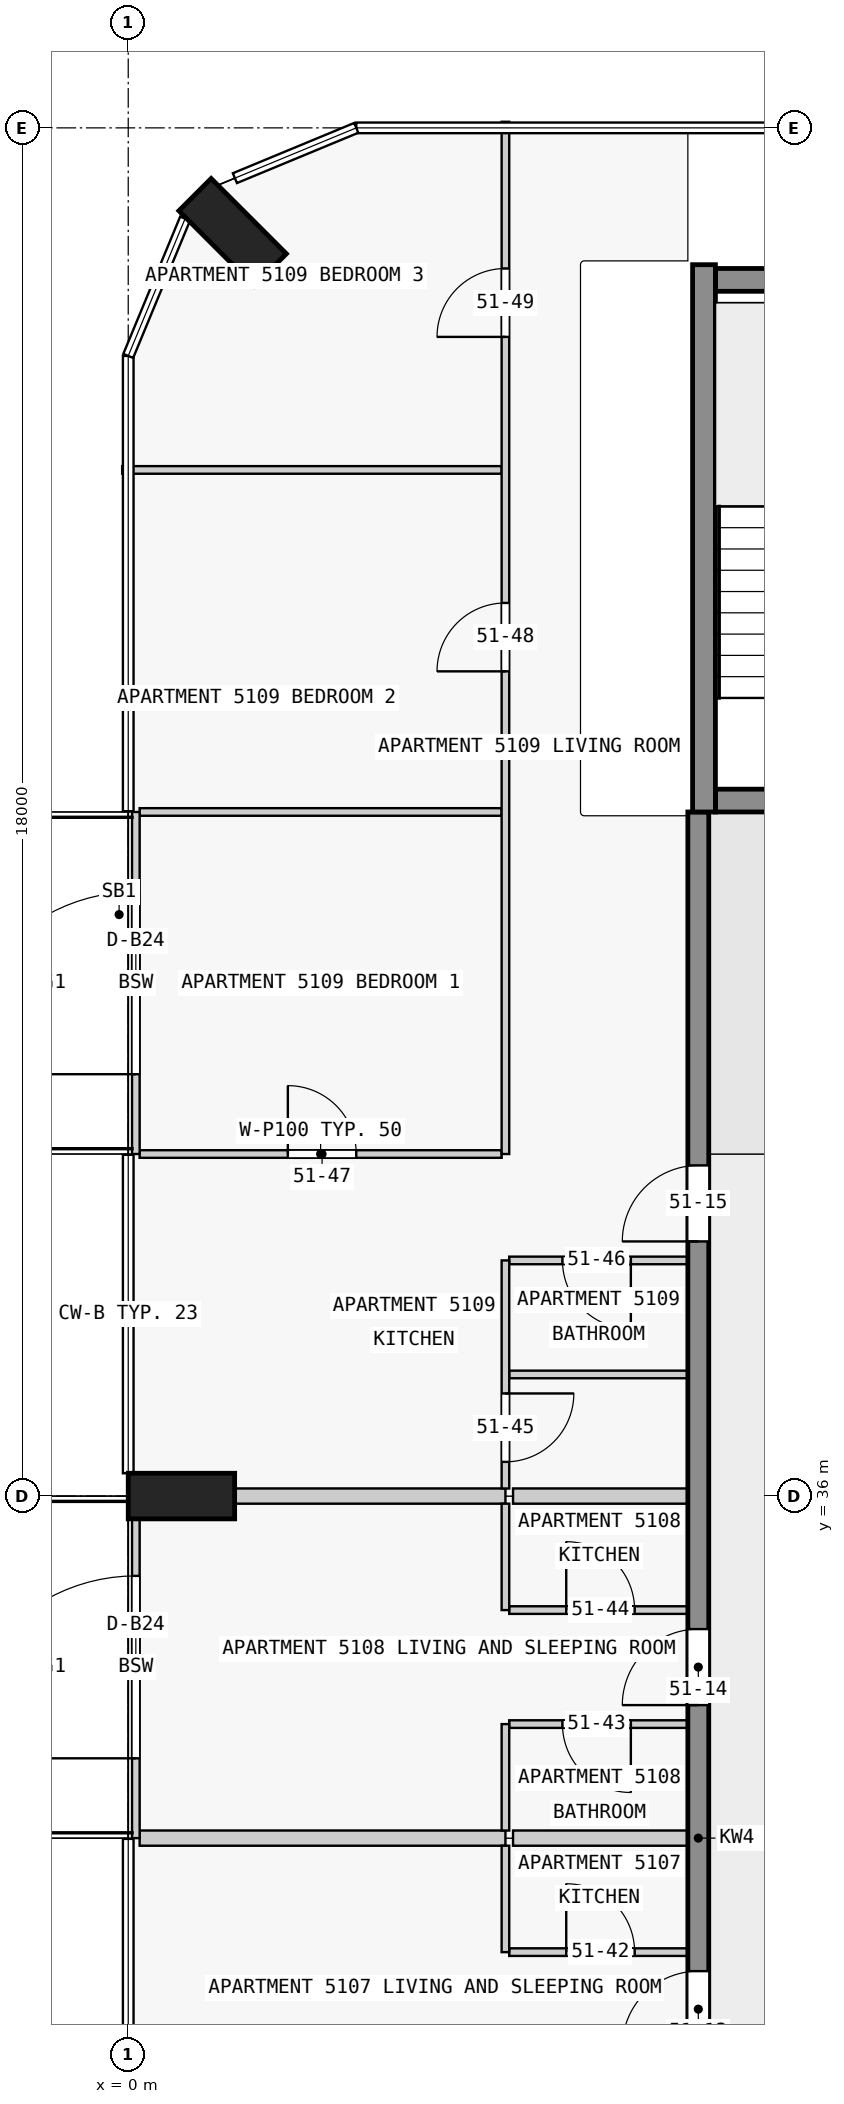
"""IFC4 building model, lengths in metres.
Left out: names, types, materials, properties, quantities, classifications, styles, units other than length and angle.
Written with IfcOpenShell. Run it as: python <this file> out.ifc"""

import sys

from ifc_helpers import new_model, si_unit, direction, frame, frame_2d, origin, origin_2d, place, context, subcontext, project, spatial, rectangle, extrude, element, fill, save


model = new_model("IFC4")
c1 = context("Model", 3, precision=1e-05, world=origin(), true_north=direction((0.0, 1.0)))
c2 = subcontext(c1, "Body", "Model", "MODEL_VIEW")
j1 = project(units=[si_unit("LENGTHUNIT", "METRE"), si_unit("PLANEANGLEUNIT", "RADIAN")], contexts=[c1])
p1 = place(None, origin())
s1 = spatial("IfcSite", under=j1, at=p1, CompositionType="ELEMENT")
p2 = place(p1, origin())
s2 = spatial("IfcBuilding", under=s1, at=p2, CompositionType="ELEMENT")
p3 = place(p2, frame((0.0, 0.0, 197.9)))
s3 = spatial("IfcBuildingStorey", under=s2, at=p3, CompositionType="ELEMENT", Elevation=197.9)
for number, where, z_axis, x_axis in (
    (1, (1.374, 52.626, 0.0), (0.0, 0.0, 1.0), (0.707, 0.707, 0.0)),
    (2, (0.7, 36.0, 0.0), (0.0, 0.0, 1.0), (0.0, 1.0, 0.0)),
):
    element("IfcColumn", number, at=place(p3, frame(where, z_axis=z_axis, x_axis=x_axis)), inside=s3, PredefinedType="COLUMN", context=c2, shape_type="SweptSolid", body=[
        extrude(rectangle(XDim=0.6, YDim=1.4, at=origin_2d()), origin(), (0.0, 0.0, 1.0), 3.5),
    ])
p4 = place(p3, frame((7.725, 45.15, 0.0), z_axis=(0.0, 0.0, 1.0), x_axis=(1.0, 0.0, 0.0)))
e3 = element("IfcWall", 3, at=p4, inside=s3, PredefinedType="SHEAR", context=c2, shape_type="SweptSolid", body=[
    extrude(rectangle(XDim=2.55, YDim=0.3, at=frame_2d((1.275, 0.0))), origin(), (0.0, 0.0, 1.0), 3.5),
])
p5 = place(p4, frame((0.725, 0.0, 0.0)))
e4 = element("IfcOpeningElement", 4, at=p5, cuts=e3, PredefinedType="OPENING", context=c2, shape_type="SweptSolid", body=[
    extrude(rectangle(XDim=1.1, YDim=2.1, at=frame_2d((0.55, 1.05))), frame((0.0, 0.16, 0.0), z_axis=(0.0, -1.0, 0.0), x_axis=(1.0, 0.0, 0.0)), (0.0, 0.0, 1.0), 0.32),
])
p6 = place(p3, frame((7.725, 52.0, 0.0), z_axis=(0.0, 0.0, 1.0), x_axis=(1.0, 0.0, 0.0)))
e5 = element("IfcWall", 5, at=p6, inside=s3, PredefinedType="SHEAR", context=c2, shape_type="SweptSolid", body=[
    extrude(rectangle(XDim=2.55, YDim=0.3, at=frame_2d((1.275, 0.0))), origin(), (0.0, 0.0, 1.0), 3.5),
])
p7 = place(p3, frame((7.575, 45.0, 0.0), z_axis=(0.0, 0.0, 1.0), x_axis=(0.0, 1.0, 0.0)))
e6 = element("IfcWall", 6, at=p7, inside=s3, PredefinedType="SHEAR", context=c2, shape_type="SweptSolid", body=[
    extrude(rectangle(XDim=7.2, YDim=0.3, at=frame_2d((3.6, 0.0))), origin(), (0.0, 0.0, 1.0), 3.5),
])
p8 = place(p3, frame((7.5, 18.0, 0.0), z_axis=(0.0, 0.0, 1.0), x_axis=(0.0, 1.0, 0.0)))
e7 = element("IfcWall", 7, at=p8, inside=s3, PredefinedType="SHEAR", context=c2, shape_type="SweptSolid", body=[
    extrude(rectangle(XDim=27.0, YDim=0.275, at=frame_2d((13.5, 0.0))), origin(), (0.0, 0.0, 1.0), 3.25),
])
p9 = place(p8, frame((1.75, 0.0, 0.0)))
e8 = element("IfcOpeningElement", 8, at=p9, cuts=e7, PredefinedType="OPENING", context=c2, shape_type="SweptSolid", body=[
    extrude(rectangle(XDim=1.0, YDim=2.1, at=frame_2d((0.5, 1.05))), frame((0.0, 0.147, 0.0), z_axis=(0.0, -1.0, 0.0), x_axis=(1.0, 0.0, 0.0)), (0.0, 0.0, 1.0), 0.295),
])
p10 = place(p8, frame((5.85, 0.0, 0.0)))
e9 = element("IfcOpeningElement", 9, at=p10, cuts=e7, PredefinedType="OPENING", context=c2, shape_type="SweptSolid", body=[
    extrude(rectangle(XDim=1.8, YDim=2.1, at=frame_2d((0.9, 1.05))), frame((0.0, 0.147, 0.0), z_axis=(0.0, -1.0, 0.0), x_axis=(1.0, 0.0, 0.0)), (0.0, 0.0, 1.0), 0.295),
])
p11 = place(p8, frame((10.75, 0.0, 0.0)))
e10 = element("IfcOpeningElement", 10, at=p11, cuts=e7, PredefinedType="OPENING", context=c2, shape_type="SweptSolid", body=[
    extrude(rectangle(XDim=1.0, YDim=2.1, at=frame_2d((0.5, 1.05))), frame((0.0, 0.147, 0.0), z_axis=(0.0, -1.0, 0.0), x_axis=(1.0, 0.0, 0.0)), (0.0, 0.0, 1.0), 0.295),
])
p12 = place(p8, frame((15.25, 0.0, 0.0)))
e11 = element("IfcOpeningElement", 11, at=p12, cuts=e7, PredefinedType="OPENING", context=c2, shape_type="SweptSolid", body=[
    extrude(rectangle(XDim=1.0, YDim=2.1, at=frame_2d((0.5, 1.05))), frame((0.0, 0.147, 0.0), z_axis=(0.0, -1.0, 0.0), x_axis=(1.0, 0.0, 0.0)), (0.0, 0.0, 1.0), 0.295),
])
p13 = place(p8, frame((21.35, 0.0, 0.0)))
e12 = element("IfcOpeningElement", 12, at=p13, cuts=e7, PredefinedType="OPENING", context=c2, shape_type="SweptSolid", body=[
    extrude(rectangle(XDim=1.0, YDim=2.1, at=frame_2d((0.5, 1.05))), frame((0.0, 0.147, 0.0), z_axis=(0.0, -1.0, 0.0), x_axis=(1.0, 0.0, 0.0)), (0.0, 0.0, 1.0), 0.295),
])
p14 = place(p3, frame((0.1, 31.5, 0.0), z_axis=(0.0, 0.0, 1.0), x_axis=(0.0, 1.0, 0.0)))
e13 = element("IfcWall", 13, at=p14, inside=s3, PredefinedType="STANDARD", context=c2, shape_type="SweptSolid", body=[
    extrude(rectangle(XDim=4.5, YDim=0.1, at=frame_2d((2.25, 0.0))), origin(), (0.0, 0.0, 1.0), 3.25),
])
p15 = place(p14, frame((1.05, 0.0, 0.0)))
e14 = element("IfcOpeningElement", 14, at=p15, cuts=e13, PredefinedType="OPENING", context=c2, shape_type="SweptSolid", body=[
    extrude(rectangle(XDim=2.4, YDim=2.4, at=frame_2d((1.2, 1.2))), frame((0.0, 0.06, 0.0), z_axis=(0.0, -1.0, 0.0), x_axis=(1.0, 0.0, 0.0)), (0.0, 0.0, 1.0), 0.12),
])
p16 = place(p3, frame((0.1, 40.5, 0.0), z_axis=(0.0, 0.0, 1.0), x_axis=(0.0, 1.0, 0.0)))
e15 = element("IfcWall", 15, at=p16, inside=s3, PredefinedType="STANDARD", context=c2, shape_type="SweptSolid", body=[
    extrude(rectangle(XDim=4.5, YDim=0.1, at=frame_2d((2.25, 0.0))), origin(), (0.0, 0.0, 1.0), 3.25),
])
p17 = place(p16, frame((1.05, 0.0, 0.0)))
e16 = element("IfcOpeningElement", 16, at=p17, cuts=e15, PredefinedType="OPENING", context=c2, shape_type="SweptSolid", body=[
    extrude(rectangle(XDim=2.4, YDim=2.4, at=frame_2d((1.2, 1.2))), frame((0.0, 0.06, 0.0), z_axis=(0.0, -1.0, 0.0), x_axis=(1.0, 0.0, 0.0)), (0.0, 0.0, 1.0), 0.12),
])
p18 = place(p3, frame((5.012, 30.0, 0.0), z_axis=(0.0, 0.0, 1.0), x_axis=(1.0, 0.0, 0.0)))
e17 = element("IfcWall", 17, at=p18, inside=s3, PredefinedType="PARTITIONING", context=c2, shape_type="SweptSolid", body=[
    extrude(rectangle(XDim=2.35, YDim=0.1, at=frame_2d((1.175, 0.0))), origin(), (0.0, 0.0, 1.0), 3.25),
])
p19 = place(p18, frame((0.75, 0.0, 0.0)))
e18 = element("IfcOpeningElement", 18, at=p19, cuts=e17, PredefinedType="OPENING", context=c2, shape_type="SweptSolid", body=[
    extrude(rectangle(XDim=0.9, YDim=2.1, at=frame_2d((0.45, 1.05))), frame((0.0, 0.06, 0.0), z_axis=(0.0, -1.0, 0.0), x_axis=(1.0, 0.0, 0.0)), (0.0, 0.0, 1.0), 0.12),
])
p20 = place(p3, frame((7.363, 31.5, 0.0), z_axis=(0.0, 0.0, 1.0), x_axis=(-1.0, 0.0, 0.0)))
e19 = element("IfcWall", 19, at=p20, inside=s3, PredefinedType="PARTITIONING", context=c2, shape_type="SweptSolid", body=[
    extrude(rectangle(XDim=2.3, YDim=0.2, at=frame_2d((1.15, 0.0))), origin(), (0.0, 0.0, 1.0), 3.25),
])
p21 = place(p3, frame((0.15, 31.5, 0.0), z_axis=(0.0, 0.0, 1.0), x_axis=(1.0, 0.0, 0.0)))
e20 = element("IfcWall", 20, at=p21, inside=s3, PredefinedType="PARTITIONING", context=c2, shape_type="SweptSolid", body=[
    extrude(rectangle(XDim=4.812, YDim=0.2, at=frame_2d((2.406, 0.0))), origin(), (0.0, 0.0, 1.0), 3.25),
])
p22 = place(p3, frame((7.363, 33.0, 0.0), z_axis=(0.0, 0.0, 1.0), x_axis=(-1.0, 0.0, 0.0)))
e21 = element("IfcWall", 21, at=p22, inside=s3, PredefinedType="PARTITIONING", context=c2, shape_type="SweptSolid", body=[
    extrude(rectangle(XDim=2.35, YDim=0.1, at=frame_2d((1.175, 0.0))), origin(), (0.0, 0.0, 1.0), 3.25),
])
p23 = place(p22, frame((0.75, 0.0, 0.0)))
e22 = element("IfcOpeningElement", 22, at=p23, cuts=e21, PredefinedType="OPENING", context=c2, shape_type="SweptSolid", body=[
    extrude(rectangle(XDim=0.9, YDim=2.1, at=frame_2d((0.45, 1.05))), frame((0.0, 0.06, 0.0), z_axis=(0.0, -1.0, 0.0), x_axis=(1.0, 0.0, 0.0)), (0.0, 0.0, 1.0), 0.12),
])
p24 = place(p3, frame((5.012, 34.5, 0.0), z_axis=(0.0, 0.0, 1.0), x_axis=(1.0, 0.0, 0.0)))
e23 = element("IfcWall", 23, at=p24, inside=s3, PredefinedType="PARTITIONING", context=c2, shape_type="SweptSolid", body=[
    extrude(rectangle(XDim=2.35, YDim=0.1, at=frame_2d((1.175, 0.0))), origin(), (0.0, 0.0, 1.0), 3.25),
])
p25 = place(p24, frame((0.75, 0.0, 0.0)))
e24 = element("IfcOpeningElement", 24, at=p25, cuts=e23, PredefinedType="OPENING", context=c2, shape_type="SweptSolid", body=[
    extrude(rectangle(XDim=0.9, YDim=2.1, at=frame_2d((0.45, 1.05))), frame((0.0, 0.06, 0.0), z_axis=(0.0, -1.0, 0.0), x_axis=(1.0, 0.0, 0.0)), (0.0, 0.0, 1.0), 0.12),
])
p26 = place(p3, frame((7.363, 36.0, 0.0), z_axis=(0.0, 0.0, 1.0), x_axis=(-1.0, 0.0, 0.0)))
e25 = element("IfcWall", 25, at=p26, inside=s3, PredefinedType="PARTITIONING", context=c2, shape_type="SweptSolid", body=[
    extrude(rectangle(XDim=2.3, YDim=0.2, at=frame_2d((1.15, 0.0))), origin(), (0.0, 0.0, 1.0), 3.25),
])
p27 = place(p3, frame((1.4, 36.0, 0.0), z_axis=(0.0, 0.0, 1.0), x_axis=(1.0, 0.0, 0.0)))
e26 = element("IfcWall", 26, at=p27, inside=s3, PredefinedType="PARTITIONING", context=c2, shape_type="SweptSolid", body=[
    extrude(rectangle(XDim=3.562, YDim=0.2, at=frame_2d((1.781, 0.0))), origin(), (0.0, 0.0, 1.0), 3.25),
])
p28 = place(p3, frame((7.363, 37.6, 0.0), z_axis=(0.0, 0.0, 1.0), x_axis=(-1.0, 0.0, 0.0)))
e27 = element("IfcWall", 27, at=p28, inside=s3, PredefinedType="PARTITIONING", context=c2, shape_type="SweptSolid", body=[
    extrude(rectangle(XDim=2.35, YDim=0.1, at=frame_2d((1.175, 0.0))), origin(), (0.0, 0.0, 1.0), 3.25),
])
p29 = place(p3, frame((7.363, 39.1, 0.0), z_axis=(0.0, 0.0, 1.0), x_axis=(-1.0, 0.0, 0.0)))
e28 = element("IfcWall", 28, at=p29, inside=s3, PredefinedType="PARTITIONING", context=c2, shape_type="SweptSolid", body=[
    extrude(rectangle(XDim=2.35, YDim=0.1, at=frame_2d((1.175, 0.0))), origin(), (0.0, 0.0, 1.0), 3.25),
])
p30 = place(p29, frame((0.75, 0.0, 0.0)))
e29 = element("IfcOpeningElement", 29, at=p30, cuts=e28, PredefinedType="OPENING", context=c2, shape_type="SweptSolid", body=[
    extrude(rectangle(XDim=0.9, YDim=2.1, at=frame_2d((0.45, 1.05))), frame((0.0, 0.06, 0.0), z_axis=(0.0, -1.0, 0.0), x_axis=(1.0, 0.0, 0.0)), (0.0, 0.0, 1.0), 0.12),
])
p31 = place(p3, frame((0.15, 40.5, 0.0), z_axis=(0.0, 0.0, 1.0), x_axis=(1.0, 0.0, 0.0)))
e30 = element("IfcWall", 30, at=p31, inside=s3, PredefinedType="PARTITIONING", context=c2, shape_type="SweptSolid", body=[
    extrude(rectangle(XDim=4.763, YDim=0.1, at=frame_2d((2.381, 0.0))), origin(), (0.0, 0.0, 1.0), 3.25),
])
p32 = place(p31, frame((1.95, 0.0, 0.0)))
e31 = element("IfcOpeningElement", 31, at=p32, cuts=e30, PredefinedType="OPENING", context=c2, shape_type="SweptSolid", body=[
    extrude(rectangle(XDim=0.9, YDim=2.1, at=frame_2d((0.45, 1.05))), frame((0.0, 0.06, 0.0), z_axis=(0.0, -1.0, 0.0), x_axis=(1.0, 0.0, 0.0)), (0.0, 0.0, 1.0), 0.12),
])
p33 = place(p3, frame((4.913, 45.0, 0.0), z_axis=(0.0, 0.0, 1.0), x_axis=(-1.0, 0.0, 0.0)))
e32 = element("IfcWall", 32, at=p33, inside=s3, PredefinedType="PARTITIONING", context=c2, shape_type="SweptSolid", body=[
    extrude(rectangle(XDim=4.763, YDim=0.1, at=frame_2d((2.381, 0.0))), origin(), (0.0, 0.0, 1.0), 3.25),
])
p34 = place(p3, frame((4.913, 49.5, 0.0), z_axis=(0.0, 0.0, 1.0), x_axis=(-1.0, 0.0, 0.0)))
e33 = element("IfcWall", 33, at=p34, inside=s3, PredefinedType="PARTITIONING", context=c2, shape_type="SweptSolid", body=[
    extrude(rectangle(XDim=4.993, YDim=0.1, at=frame_2d((2.496, 0.0))), origin(), (0.0, 0.0, 1.0), 3.25),
])
for number, where, z_axis, x_axis in (
    (34, (4.962, 31.4, 0.0), (0.0, 0.0, 1.0), (0.0, -1.0, 0.0)),
    (35, (4.962, 33.0, 0.0), (0.0, 0.0, 1.0), (0.0, -1.0, 0.0)),
    (36, (4.962, 35.9, 0.0), (0.0, 0.0, 1.0), (0.0, -1.0, 0.0)),
):
    element("IfcWall", number, at=place(p3, frame(where, z_axis=z_axis, x_axis=x_axis)), inside=s3, PredefinedType="PARTITIONING", context=c2, shape_type="SweptSolid", body=[
        extrude(rectangle(XDim=1.4, YDim=0.1, at=frame_2d((0.7, 0.0))), origin(), (0.0, 0.0, 1.0), 3.25),
    ])
p35 = place(p3, frame((4.962, 39.1, 0.0), z_axis=(0.0, 0.0, 1.0), x_axis=(0.0, -1.0, 0.0)))
e37 = element("IfcWall", 37, at=p35, inside=s3, PredefinedType="PARTITIONING", context=c2, shape_type="SweptSolid", body=[
    extrude(rectangle(XDim=3.0, YDim=0.1, at=frame_2d((1.5, 0.0))), origin(), (0.0, 0.0, 1.0), 3.25),
])
p36 = place(p35, frame((1.75, 0.0, 0.0)))
e38 = element("IfcOpeningElement", 38, at=p36, cuts=e37, PredefinedType="OPENING", context=c2, shape_type="SweptSolid", body=[
    extrude(rectangle(XDim=0.9, YDim=2.1, at=frame_2d((0.45, 1.05))), frame((0.0, 0.06, 0.0), z_axis=(0.0, -1.0, 0.0), x_axis=(1.0, 0.0, 0.0)), (0.0, 0.0, 1.0), 0.12),
])
p37 = place(p3, frame((4.962, 40.5, 0.0), z_axis=(0.0, 0.0, 1.0), x_axis=(0.0, 1.0, 0.0)))
e39 = element("IfcWall", 39, at=p37, inside=s3, PredefinedType="PARTITIONING", context=c2, shape_type="SweptSolid", body=[
    extrude(rectangle(XDim=13.58, YDim=0.1, at=frame_2d((6.79, 0.0))), origin(), (0.0, 0.0, 1.0), 3.25),
])
p38 = place(p37, frame((6.35, 0.0, 0.0)))
e40 = element("IfcOpeningElement", 40, at=p38, cuts=e39, PredefinedType="OPENING", context=c2, shape_type="SweptSolid", body=[
    extrude(rectangle(XDim=0.9, YDim=2.1, at=frame_2d((0.45, 1.05))), frame((0.0, 0.06, 0.0), z_axis=(0.0, -1.0, 0.0), x_axis=(1.0, 0.0, 0.0)), (0.0, 0.0, 1.0), 0.12),
])
p39 = place(p37, frame((10.75, 0.0, 0.0)))
e41 = element("IfcOpeningElement", 41, at=p39, cuts=e39, PredefinedType="OPENING", context=c2, shape_type="SweptSolid", body=[
    extrude(rectangle(XDim=0.9, YDim=2.1, at=frame_2d((0.45, 1.05))), frame((0.0, 0.06, 0.0), z_axis=(0.0, -1.0, 0.0), x_axis=(1.0, 0.0, 0.0)), (0.0, 0.0, 1.0), 0.12),
])
p40 = place(p15, origin())
e42 = element("IfcDoor", 42, at=p40, inside=s3, OperationType="SINGLE_SWING_LEFT", PredefinedType="DOOR", context=c2, shape_type="SweptSolid", body=[
    extrude(rectangle(XDim=2.4, YDim=2.4, at=frame_2d((1.2, 1.2))), frame((0.0, 0.025, 0.0), z_axis=(0.0, -1.0, 0.0), x_axis=(1.0, 0.0, 0.0)), (0.0, 0.0, 1.0), 0.05),
])
fill(e14, e42)
p41 = place(p17, origin())
e43 = element("IfcDoor", 43, at=p41, inside=s3, OperationType="SINGLE_SWING_LEFT", PredefinedType="DOOR", context=c2, shape_type="SweptSolid", body=[
    extrude(rectangle(XDim=2.4, YDim=2.4, at=frame_2d((1.2, 1.2))), frame((0.0, 0.025, 0.0), z_axis=(0.0, -1.0, 0.0), x_axis=(1.0, 0.0, 0.0)), (0.0, 0.0, 1.0), 0.05),
])
fill(e16, e43)
p42 = place(p11, origin())
e44 = element("IfcDoor", 44, at=p42, inside=s3, OperationType="SINGLE_SWING_LEFT", PredefinedType="DOOR", context=c2, shape_type="SweptSolid", body=[
    extrude(rectangle(XDim=1.0, YDim=2.1, at=frame_2d((0.5, 1.05))), frame((0.0, 0.025, 0.0), z_axis=(0.0, -1.0, 0.0), x_axis=(1.0, 0.0, 0.0)), (0.0, 0.0, 1.0), 0.05),
])
fill(e10, e44)
p43 = place(p12, origin())
e45 = element("IfcDoor", 45, at=p43, inside=s3, OperationType="SINGLE_SWING_RIGHT", PredefinedType="DOOR", context=c2, shape_type="SweptSolid", body=[
    extrude(rectangle(XDim=1.0, YDim=2.1, at=frame_2d((0.5, 1.05))), frame((0.0, 0.025, 0.0), z_axis=(0.0, -1.0, 0.0), x_axis=(1.0, 0.0, 0.0)), (0.0, 0.0, 1.0), 0.05),
])
fill(e11, e45)
p44 = place(p13, origin())
e46 = element("IfcDoor", 46, at=p44, inside=s3, OperationType="SINGLE_SWING_RIGHT", PredefinedType="DOOR", context=c2, shape_type="SweptSolid", body=[
    extrude(rectangle(XDim=1.0, YDim=2.1, at=frame_2d((0.5, 1.05))), frame((0.0, 0.025, 0.0), z_axis=(0.0, -1.0, 0.0), x_axis=(1.0, 0.0, 0.0)), (0.0, 0.0, 1.0), 0.05),
])
fill(e12, e46)
p45 = place(p19, origin())
e47 = element("IfcDoor", 47, at=p45, inside=s3, OperationType="SINGLE_SWING_RIGHT", PredefinedType="DOOR", context=c2, shape_type="SweptSolid", body=[
    extrude(rectangle(XDim=0.9, YDim=2.1, at=frame_2d((0.45, 1.05))), frame((0.0, 0.025, 0.0), z_axis=(0.0, -1.0, 0.0), x_axis=(1.0, 0.0, 0.0)), (0.0, 0.0, 1.0), 0.05),
])
fill(e18, e47)
p46 = place(p23, origin())
e48 = element("IfcDoor", 48, at=p46, inside=s3, OperationType="SINGLE_SWING_RIGHT", PredefinedType="DOOR", context=c2, shape_type="SweptSolid", body=[
    extrude(rectangle(XDim=0.9, YDim=2.1, at=frame_2d((0.45, 1.05))), frame((0.0, 0.025, 0.0), z_axis=(0.0, -1.0, 0.0), x_axis=(1.0, 0.0, 0.0)), (0.0, 0.0, 1.0), 0.05),
])
fill(e22, e48)
p47 = place(p25, origin())
e49 = element("IfcDoor", 49, at=p47, inside=s3, OperationType="SINGLE_SWING_RIGHT", PredefinedType="DOOR", context=c2, shape_type="SweptSolid", body=[
    extrude(rectangle(XDim=0.9, YDim=2.1, at=frame_2d((0.45, 1.05))), frame((0.0, 0.025, 0.0), z_axis=(0.0, -1.0, 0.0), x_axis=(1.0, 0.0, 0.0)), (0.0, 0.0, 1.0), 0.05),
])
fill(e24, e49)
p48 = place(p36, origin())
e50 = element("IfcDoor", 50, at=p48, inside=s3, OperationType="SINGLE_SWING_RIGHT", PredefinedType="DOOR", context=c2, shape_type="SweptSolid", body=[
    extrude(rectangle(XDim=0.9, YDim=2.1, at=frame_2d((0.45, 1.05))), frame((0.0, 0.025, 0.0), z_axis=(0.0, -1.0, 0.0), x_axis=(1.0, 0.0, 0.0)), (0.0, 0.0, 1.0), 0.05),
])
fill(e38, e50)
p49 = place(p30, origin())
e51 = element("IfcDoor", 51, at=p49, inside=s3, OperationType="SINGLE_SWING_RIGHT", PredefinedType="DOOR", context=c2, shape_type="SweptSolid", body=[
    extrude(rectangle(XDim=0.9, YDim=2.1, at=frame_2d((0.45, 1.05))), frame((0.0, 0.025, 0.0), z_axis=(0.0, -1.0, 0.0), x_axis=(1.0, 0.0, 0.0)), (0.0, 0.0, 1.0), 0.05),
])
fill(e29, e51)
p50 = place(p32, origin())
e52 = element("IfcDoor", 52, at=p50, inside=s3, OperationType="SINGLE_SWING_RIGHT", PredefinedType="DOOR", context=c2, shape_type="SweptSolid", body=[
    extrude(rectangle(XDim=0.9, YDim=2.1, at=frame_2d((0.45, 1.05))), frame((0.0, 0.025, 0.0), z_axis=(0.0, -1.0, 0.0), x_axis=(1.0, 0.0, 0.0)), (0.0, 0.0, 1.0), 0.05),
])
fill(e31, e52)
p51 = place(p38, origin())
e53 = element("IfcDoor", 53, at=p51, inside=s3, OperationType="SINGLE_SWING_RIGHT", PredefinedType="DOOR", context=c2, shape_type="SweptSolid", body=[
    extrude(rectangle(XDim=0.9, YDim=2.1, at=frame_2d((0.45, 1.05))), frame((0.0, 0.025, 0.0), z_axis=(0.0, -1.0, 0.0), x_axis=(1.0, 0.0, 0.0)), (0.0, 0.0, 1.0), 0.05),
])
fill(e40, e53)
p52 = place(p39, origin())
e54 = element("IfcDoor", 54, at=p52, inside=s3, OperationType="SINGLE_SWING_RIGHT", PredefinedType="DOOR", context=c2, shape_type="SweptSolid", body=[
    extrude(rectangle(XDim=0.9, YDim=2.1, at=frame_2d((0.45, 1.05))), frame((0.0, 0.025, 0.0), z_axis=(0.0, -1.0, 0.0), x_axis=(1.0, 0.0, 0.0)), (0.0, 0.0, 1.0), 0.05),
])
fill(e41, e54)
save(model, sys.argv[1])
